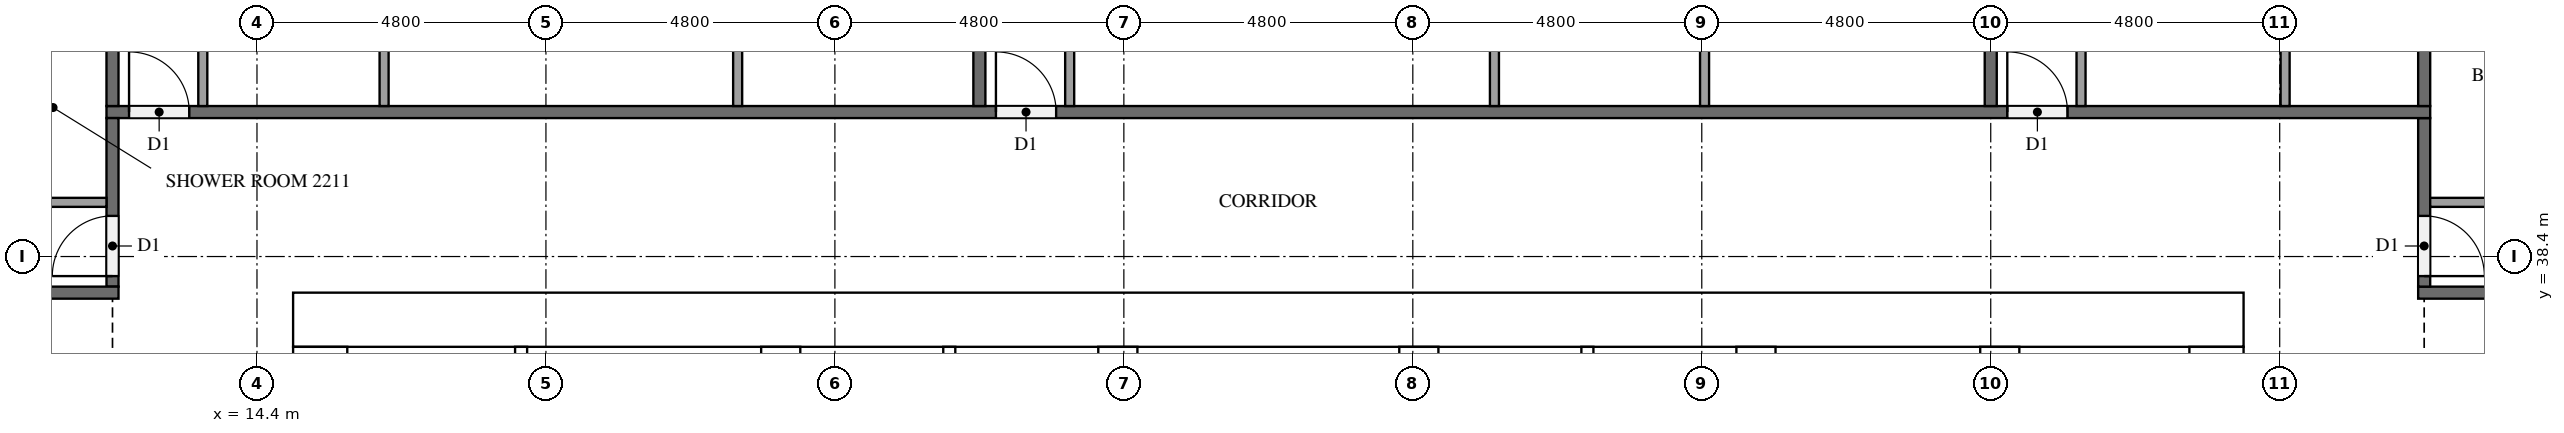
"""IFC4 building model, lengths in metres.
Left out: names, types, materials, properties, quantities, classifications, styles, units other than length and angle.
Written with IfcOpenShell. Run it as: python <this file> out.ifc"""

import sys

from ifc_helpers import new_model, si_unit, direction, frame, frame_2d, origin, place, context, subcontext, project, spatial, rectangle, extrude, element, fill, save


model = new_model("IFC4")
c1 = context("Model", 3, precision=1e-05, world=origin(), true_north=direction((0.0, 1.0)))
c2 = subcontext(c1, "Body", "Model", "MODEL_VIEW")
j1 = project(units=[si_unit("LENGTHUNIT", "METRE"), si_unit("PLANEANGLEUNIT", "RADIAN")], contexts=[c1])
p1 = place(None, origin())
s1 = spatial("IfcSite", under=j1, at=p1, CompositionType="ELEMENT")
p2 = place(p1, origin())
s2 = spatial("IfcBuilding", under=s1, at=p2, CompositionType="ELEMENT")
p3 = place(p2, frame((0.0, 0.0, 89.2)))
s3 = spatial("IfcBuildingStorey", under=s2, at=p3, CompositionType="ELEMENT", Elevation=89.2)
p4 = place(p3, frame((15.0, 37.35, 0.0), z_axis=(0.0, 0.0, 1.0), x_axis=(1.0, 0.0, 0.0)))
e1 = element("IfcWall", 1, at=p4, inside=s3, PredefinedType="SHEAR", context=c2, shape_type="SweptSolid", body=[
    extrude(rectangle(XDim=32.4, YDim=0.9, at=frame_2d((16.2, 0.0))), origin(), (0.0, 0.0, 1.0), 3.2),
])
p5 = place(p4, frame((15.3, 0.0, 0.0)))
e2 = element("IfcOpeningElement", 2, at=p5, cuts=e1, PredefinedType="OPENING", context=c2, shape_type="SweptSolid", body=[
    extrude(rectangle(XDim=1.8, YDim=2.1, at=frame_2d((0.9, 1.05))), frame((0.0, 0.46, 0.0), z_axis=(0.0, -1.0, 0.0), x_axis=(1.0, 0.0, 0.0)), (0.0, 0.0, 1.0), 0.92),
])
p6 = place(p4, frame((1.794, 0.0, 0.0)))
e3 = element("IfcOpeningElement", 3, at=p6, cuts=e1, PredefinedType="OPENING", context=c2, shape_type="SweptSolid", body=[
    extrude(rectangle(XDim=1.0, YDim=2.1, at=frame_2d((0.5, 1.05))), frame((0.0, 0.46, 0.0), z_axis=(0.0, -1.0, 0.0), x_axis=(1.0, 0.0, 0.0)), (0.0, 0.0, 1.0), 0.92),
])
p7 = place(p4, frame((5.331, 0.0, 0.0)))
e4 = element("IfcOpeningElement", 4, at=p7, cuts=e1, PredefinedType="OPENING", context=c2, shape_type="SweptSolid", body=[
    extrude(rectangle(XDim=1.0, YDim=2.1, at=frame_2d((0.5, 1.05))), frame((0.0, 0.46, 0.0), z_axis=(0.0, -1.0, 0.0), x_axis=(1.0, 0.0, 0.0)), (0.0, 0.0, 1.0), 0.92),
])
p8 = place(p3, frame((15.45, 15.9, 0.0), z_axis=(0.0, 0.0, 1.0), x_axis=(0.0, 1.0, 0.0)))
e5 = element("IfcWall", 5, at=p8, inside=s3, PredefinedType="SHEAR", context=c2, shape_type="SweptSolid", body=[
    extrude(rectangle(XDim=21.0, YDim=0.9, at=frame_2d((10.5, 0.0))), origin(), (0.0, 0.0, 1.0), 3.2),
])
p9 = place(p8, frame((4.86, 0.0, 0.0)))
e6 = element("IfcOpeningElement", 6, at=p9, cuts=e5, PredefinedType="OPENING", context=c2, shape_type="SweptSolid", body=[
    extrude(rectangle(XDim=1.2, YDim=2.1, at=frame_2d((0.6, 1.05))), frame((0.0, 0.46, 0.0), z_axis=(0.0, -1.0, 0.0), x_axis=(1.0, 0.0, 0.0)), (0.0, 0.0, 1.0), 0.92),
])
p10 = place(p3, frame((46.95, 15.9, 0.0), z_axis=(0.0, 0.0, 1.0), x_axis=(0.0, 1.0, 0.0)))
e7 = element("IfcWall", 7, at=p10, inside=s3, PredefinedType="SHEAR", context=c2, shape_type="SweptSolid", body=[
    extrude(rectangle(XDim=21.0, YDim=0.9, at=frame_2d((10.5, 0.0))), origin(), (0.0, 0.0, 1.0), 3.2),
])
p11 = place(p10, frame((10.2, 0.0, 0.0)))
e8 = element("IfcOpeningElement", 8, at=p11, cuts=e7, PredefinedType="OPENING", context=c2, shape_type="SweptSolid", body=[
    extrude(rectangle(XDim=1.2, YDim=2.1, at=frame_2d((0.6, 1.05))), frame((0.0, 0.46, 0.0), z_axis=(0.0, -1.0, 0.0), x_axis=(1.0, 0.0, 0.0)), (0.0, 0.0, 1.0), 0.92),
])
p12 = place(p3, frame((23.1, 15.9, 0.0), z_axis=(0.0, 0.0, 1.0), x_axis=(0.0, 1.0, 0.0)))
e9 = element("IfcWall", 9, at=p12, inside=s3, PredefinedType="SHEAR", context=c2, shape_type="SweptSolid", body=[
    extrude(rectangle(XDim=21.0, YDim=0.65, at=frame_2d((10.5, 0.0))), origin(), (0.0, 0.0, 1.0), 3.2),
])
p13 = place(p3, frame((39.3, 27.75, 0.0), z_axis=(0.0, 0.0, 1.0), x_axis=(0.0, 1.0, 0.0)))
e10 = element("IfcWall", 10, at=p13, inside=s3, PredefinedType="SHEAR", context=c2, shape_type="SweptSolid", body=[
    extrude(rectangle(XDim=9.15, YDim=0.65, at=frame_2d((4.575, 0.0))), origin(), (0.0, 0.0, 1.0), 3.2),
])
p14 = place(p3, frame((43.35, 27.75, 0.0), z_axis=(0.0, 0.0, 1.0), x_axis=(0.0, 1.0, 0.0)))
e11 = element("IfcWall", 11, at=p14, inside=s3, PredefinedType="SHEAR", context=c2, shape_type="SweptSolid", body=[
    extrude(rectangle(XDim=9.15, YDim=0.65, at=frame_2d((4.575, 0.0))), origin(), (0.0, 0.0, 1.0), 3.2),
])
p15 = place(p14, frame((7.65, 0.0, 0.0)))
e12 = element("IfcOpeningElement", 12, at=p15, cuts=e11, PredefinedType="OPENING", context=c2, shape_type="SweptSolid", body=[
    extrude(rectangle(XDim=1.2, YDim=2.1, at=frame_2d((0.6, 1.05))), frame((0.0, 0.335, 0.0), z_axis=(0.0, -1.0, 0.0), x_axis=(1.0, 0.0, 0.0)), (0.0, 0.0, 1.0), 0.67),
])
for number, where, z_axis, x_axis in (
    (13, (28.7, 33.875, 0.0), (0.0, 0.0, 1.0), (0.0, 1.0, 0.0)),
    (14, (33.7, 33.875, 0.0), (0.0, 0.0, 1.0), (0.0, 1.0, 0.0)),
):
    element("IfcWall", number, at=place(p3, frame(where, z_axis=z_axis, x_axis=x_axis)), inside=s3, PredefinedType="SHEAR", context=c2, shape_type="SweptSolid", body=[
        extrude(rectangle(XDim=3.025, YDim=0.65, at=frame_2d((1.512, 0.0))), origin(), (0.0, 0.0, 1.0), 3.2),
    ])
for number, where, z_axis, x_axis in (
    (15, (25.9, 33.875, 0.0), (0.0, 0.0, 1.0), (0.0, 1.0, 0.0)),
    (16, (36.5, 33.875, 0.0), (0.0, 0.0, 1.0), (0.0, 1.0, 0.0)),
):
    element("IfcWall", number, at=place(p3, frame(where, z_axis=z_axis, x_axis=x_axis)), inside=s3, PredefinedType="SOLIDWALL", context=c2, shape_type="SweptSolid", body=[
        extrude(rectangle(XDim=3.025, YDim=0.2, at=frame_2d((1.512, 0.0))), origin(), (0.0, 0.0, 1.0), 3.2),
    ])
p16 = place(p3, frame((18.788, 31.575, 0.0), z_axis=(0.0, 0.0, 1.0), x_axis=(0.0, 1.0, 0.0)))
e17 = element("IfcWall", 17, at=p16, inside=s3, PredefinedType="PARTITIONING", context=c2, shape_type="SweptSolid", body=[
    extrude(rectangle(XDim=5.325, YDim=0.2, at=frame_2d((2.663, 0.0))), origin(), (0.0, 0.0, 1.0), 3.2),
])
p17 = place(p3, frame((52.5, 37.8, 0.0), z_axis=(0.0, 0.0, 1.0), x_axis=(-1.0, 0.0, 0.0)))
e18 = element("IfcWall", 18, at=p17, inside=s3, PredefinedType="PARTITIONING", context=c2, shape_type="SweptSolid", body=[
    extrude(rectangle(XDim=2.2, YDim=0.2, at=frame_2d((1.1, 0.0))), origin(), (0.0, 0.0, 1.0), 3.2),
])
p18 = place(p3, frame((50.4, 40.7, 0.0), z_axis=(0.0, 0.0, 1.0), x_axis=(0.0, -1.0, 0.0)))
e19 = element("IfcWall", 19, at=p18, inside=s3, PredefinedType="PARTITIONING", context=c2, shape_type="SweptSolid", body=[
    extrude(rectangle(XDim=2.8, YDim=0.2, at=frame_2d((1.4, 0.0))), origin(), (0.0, 0.0, 1.0), 3.2),
])
p19 = place(p18, frame((1.625, 0.0, 0.0)))
e20 = element("IfcOpeningElement", 20, at=p19, cuts=e19, PredefinedType="OPENING", context=c2, shape_type="SweptSolid", body=[
    extrude(rectangle(XDim=1.0, YDim=2.1, at=frame_2d((0.5, 1.05))), frame((0.0, 0.11, 0.0), z_axis=(0.0, -1.0, 0.0), x_axis=(1.0, 0.0, 0.0)), (0.0, 0.0, 1.0), 0.22),
])
p20 = place(p3, frame((11.9, 40.8, 0.0), z_axis=(0.0, 0.0, 1.0), x_axis=(1.0, 0.0, 0.0)))
e21 = element("IfcWall", 21, at=p20, inside=s3, PredefinedType="PARTITIONING", context=c2, shape_type="SweptSolid", body=[
    extrude(rectangle(XDim=38.6, YDim=0.2, at=frame_2d((19.3, 0.0))), origin(), (0.0, 0.0, 1.0), 3.2),
])
p21 = place(p20, frame((31.575, 0.0, 0.0)))
e22 = element("IfcOpeningElement", 22, at=p21, cuts=e21, PredefinedType="OPENING", context=c2, shape_type="SweptSolid", body=[
    extrude(rectangle(XDim=1.0, YDim=2.1, at=frame_2d((0.5, 1.05))), frame((0.0, 0.11, 0.0), z_axis=(0.0, -1.0, 0.0), x_axis=(1.0, 0.0, 0.0)), (0.0, 0.0, 1.0), 0.22),
])
p22 = place(p20, frame((14.775, 0.0, 0.0)))
e23 = element("IfcOpeningElement", 23, at=p22, cuts=e21, PredefinedType="OPENING", context=c2, shape_type="SweptSolid", body=[
    extrude(rectangle(XDim=1.0, YDim=2.1, at=frame_2d((0.5, 1.05))), frame((0.0, 0.11, 0.0), z_axis=(0.0, -1.0, 0.0), x_axis=(1.0, 0.0, 0.0)), (0.0, 0.0, 1.0), 0.22),
])
p23 = place(p20, frame((0.375, 0.0, 0.0)))
e24 = element("IfcOpeningElement", 24, at=p23, cuts=e21, PredefinedType="OPENING", context=c2, shape_type="SweptSolid", body=[
    extrude(rectangle(XDim=1.0, YDim=2.1, at=frame_2d((0.5, 1.05))), frame((0.0, 0.11, 0.0), z_axis=(0.0, -1.0, 0.0), x_axis=(1.0, 0.0, 0.0)), (0.0, 0.0, 1.0), 0.22),
])
p24 = place(p3, frame((12.0, 37.9, 0.0), z_axis=(0.0, 0.0, 1.0), x_axis=(0.0, 1.0, 0.0)))
e25 = element("IfcWall", 25, at=p24, inside=s3, PredefinedType="PARTITIONING", context=c2, shape_type="SweptSolid", body=[
    extrude(rectangle(XDim=2.8, YDim=0.2, at=frame_2d((1.4, 0.0))), origin(), (0.0, 0.0, 1.0), 3.2),
])
p25 = place(p24, frame((0.175, 0.0, 0.0)))
e26 = element("IfcOpeningElement", 26, at=p25, cuts=e25, PredefinedType="OPENING", context=c2, shape_type="SweptSolid", body=[
    extrude(rectangle(XDim=1.0, YDim=2.1, at=frame_2d((0.5, 1.05))), frame((0.0, 0.11, 0.0), z_axis=(0.0, -1.0, 0.0), x_axis=(1.0, 0.0, 0.0)), (0.0, 0.0, 1.0), 0.22),
])
p26 = place(p3, frame((12.1, 37.8, 0.0), z_axis=(0.0, 0.0, 1.0), x_axis=(-1.0, 0.0, 0.0)))
e27 = element("IfcWall", 27, at=p26, inside=s3, PredefinedType="PARTITIONING", context=c2, shape_type="SweptSolid", body=[
    extrude(rectangle(XDim=2.2, YDim=0.2, at=frame_2d((1.1, 0.0))), origin(), (0.0, 0.0, 1.0), 3.2),
])
for number, where, z_axis, x_axis in (
    (28, (50.4, 40.9, 0.0), (0.0, 0.0, 1.0), (0.0, 1.0, 0.0)),
    (29, (43.2, 52.7, 0.0), (0.0, 0.0, 1.0), (0.0, -1.0, 0.0)),
    (30, (26.4, 52.7, 0.0), (0.0, 0.0, 1.0), (0.0, -1.0, 0.0)),
    (31, (12.0, 52.7, 0.0), (0.0, 0.0, 1.0), (0.0, -1.0, 0.0)),
):
    element("IfcWall", number, at=place(p3, frame(where, z_axis=z_axis, x_axis=x_axis)), inside=s3, PredefinedType="PARTITIONING", context=c2, shape_type="SweptSolid", body=[
        extrude(rectangle(XDim=11.8, YDim=0.2, at=frame_2d((5.9, 0.0))), origin(), (0.0, 0.0, 1.0), 3.2),
    ])
p27 = place(p3, frame((50.5, 39.3, 0.0), z_axis=(0.0, 0.0, 1.0), x_axis=(1.0, 0.0, 0.0)))
e32 = element("IfcWall", 32, at=p27, inside=s3, PredefinedType="PARTITIONING", context=c2, shape_type="SweptSolid", body=[
    extrude(rectangle(XDim=4.025, YDim=0.15, at=frame_2d((2.012, 0.0))), origin(), (0.0, 0.0, 1.0), 3.2),
])
p28 = place(p3, frame((48.09, 40.9, 0.0), z_axis=(0.0, 0.0, 1.0), x_axis=(0.0, 1.0, 0.0)))
e33 = element("IfcWall", 33, at=p28, inside=s3, PredefinedType="PARTITIONING", context=c2, shape_type="SweptSolid", body=[
    extrude(rectangle(XDim=4.175, YDim=0.15, at=frame_2d((2.087, 0.0))), origin(), (0.0, 0.0, 1.0), 3.2),
])
p29 = place(p3, frame((44.7, 40.9, 0.0), z_axis=(0.0, 0.0, 1.0), x_axis=(0.0, 1.0, 0.0)))
e34 = element("IfcWall", 34, at=p29, inside=s3, PredefinedType="PARTITIONING", context=c2, shape_type="SweptSolid", body=[
    extrude(rectangle(XDim=4.325, YDim=0.15, at=frame_2d((2.163, 0.0))), origin(), (0.0, 0.0, 1.0), 3.2),
])
for number, where, z_axis, x_axis in (
    (35, (34.956, 40.9, 0.0), (0.0, 0.0, 1.0), (0.0, 1.0, 0.0)),
    (36, (38.446, 40.9, 0.0), (0.0, 0.0, 1.0), (0.0, 1.0, 0.0)),
):
    element("IfcWall", number, at=place(p3, frame(where, z_axis=z_axis, x_axis=x_axis)), inside=s3, PredefinedType="PARTITIONING", context=c2, shape_type="SweptSolid", body=[
        extrude(rectangle(XDim=4.475, YDim=0.15, at=frame_2d((2.238, 0.0))), origin(), (0.0, 0.0, 1.0), 3.2),
    ])
p30 = place(p3, frame((27.9, 40.9, 0.0), z_axis=(0.0, 0.0, 1.0), x_axis=(0.0, 1.0, 0.0)))
e37 = element("IfcWall", 37, at=p30, inside=s3, PredefinedType="PARTITIONING", context=c2, shape_type="SweptSolid", body=[
    extrude(rectangle(XDim=4.625, YDim=0.15, at=frame_2d((2.312, 0.0))), origin(), (0.0, 0.0, 1.0), 3.2),
])
for number, where, z_axis, x_axis in (
    (38, (16.511, 40.9, 0.0), (0.0, 0.0, 1.0), (0.0, 1.0, 0.0)),
    (39, (22.385, 40.9, 0.0), (0.0, 0.0, 1.0), (0.0, 1.0, 0.0)),
):
    element("IfcWall", number, at=place(p3, frame(where, z_axis=z_axis, x_axis=x_axis)), inside=s3, PredefinedType="PARTITIONING", context=c2, shape_type="SweptSolid", body=[
        extrude(rectangle(XDim=2.975, YDim=0.15, at=frame_2d((1.488, 0.0))), origin(), (0.0, 0.0, 1.0), 3.2),
    ])
p31 = place(p3, frame((13.5, 40.9, 0.0), z_axis=(0.0, 0.0, 1.0), x_axis=(0.0, 1.0, 0.0)))
e40 = element("IfcWall", 40, at=p31, inside=s3, PredefinedType="PARTITIONING", context=c2, shape_type="SweptSolid", body=[
    extrude(rectangle(XDim=3.125, YDim=0.15, at=frame_2d((1.562, 0.0))), origin(), (0.0, 0.0, 1.0), 3.2),
])
p32 = place(p3, frame((11.9, 39.3, 0.0), z_axis=(0.0, 0.0, 1.0), x_axis=(-1.0, 0.0, 0.0)))
e41 = element("IfcWall", 41, at=p32, inside=s3, PredefinedType="PARTITIONING", context=c2, shape_type="SweptSolid", body=[
    extrude(rectangle(XDim=1.925, YDim=0.15, at=frame_2d((0.962, 0.0))), origin(), (0.0, 0.0, 1.0), 3.2),
])
p33 = place(p5, origin())
e42 = element("IfcDoor", 42, at=p33, inside=s3, OperationType="DOUBLE_DOOR_SINGLE_SWING", PredefinedType="DOOR", context=c2, shape_type="SweptSolid", body=[
    extrude(rectangle(XDim=1.8, YDim=2.1, at=frame_2d((0.9, 1.05))), frame((0.0, 0.025, 0.0), z_axis=(0.0, -1.0, 0.0), x_axis=(1.0, 0.0, 0.0)), (0.0, 0.0, 1.0), 0.05),
])
fill(e2, e42)
p34 = place(p6, origin())
e43 = element("IfcDoor", 43, at=p34, inside=s3, OperationType="SINGLE_SWING_LEFT", PredefinedType="DOOR", context=c2, shape_type="SweptSolid", body=[
    extrude(rectangle(XDim=1.0, YDim=2.1, at=frame_2d((0.5, 1.05))), frame((0.0, 0.025, 0.0), z_axis=(0.0, -1.0, 0.0), x_axis=(1.0, 0.0, 0.0)), (0.0, 0.0, 1.0), 0.05),
])
fill(e3, e43)
p35 = place(p7, origin())
e44 = element("IfcDoor", 44, at=p35, inside=s3, OperationType="SINGLE_SWING_RIGHT", PredefinedType="DOOR", context=c2, shape_type="SweptSolid", body=[
    extrude(rectangle(XDim=1.0, YDim=2.1, at=frame_2d((0.5, 1.05))), frame((0.0, 0.025, 0.0), z_axis=(0.0, -1.0, 0.0), x_axis=(1.0, 0.0, 0.0)), (0.0, 0.0, 1.0), 0.05),
])
fill(e4, e44)
p36 = place(p19, origin())
e45 = element("IfcDoor", 45, at=p36, inside=s3, OperationType="SINGLE_SWING_RIGHT", PredefinedType="DOOR", context=c2, shape_type="SweptSolid", body=[
    extrude(rectangle(XDim=1.0, YDim=2.1, at=frame_2d((0.5, 1.05))), frame((0.0, 0.025, 0.0), z_axis=(0.0, -1.0, 0.0), x_axis=(1.0, 0.0, 0.0)), (0.0, 0.0, 1.0), 0.05),
])
fill(e20, e45)
p37 = place(p21, origin())
e46 = element("IfcDoor", 46, at=p37, inside=s3, OperationType="SINGLE_SWING_LEFT", PredefinedType="DOOR", context=c2, shape_type="SweptSolid", body=[
    extrude(rectangle(XDim=1.0, YDim=2.1, at=frame_2d((0.5, 1.05))), frame((0.0, 0.025, 0.0), z_axis=(0.0, -1.0, 0.0), x_axis=(1.0, 0.0, 0.0)), (0.0, 0.0, 1.0), 0.05),
])
fill(e22, e46)
p38 = place(p22, origin())
e47 = element("IfcDoor", 47, at=p38, inside=s3, OperationType="SINGLE_SWING_LEFT", PredefinedType="DOOR", context=c2, shape_type="SweptSolid", body=[
    extrude(rectangle(XDim=1.0, YDim=2.1, at=frame_2d((0.5, 1.05))), frame((0.0, 0.025, 0.0), z_axis=(0.0, -1.0, 0.0), x_axis=(1.0, 0.0, 0.0)), (0.0, 0.0, 1.0), 0.05),
])
fill(e23, e47)
p39 = place(p23, origin())
e48 = element("IfcDoor", 48, at=p39, inside=s3, OperationType="SINGLE_SWING_LEFT", PredefinedType="DOOR", context=c2, shape_type="SweptSolid", body=[
    extrude(rectangle(XDim=1.0, YDim=2.1, at=frame_2d((0.5, 1.05))), frame((0.0, 0.025, 0.0), z_axis=(0.0, -1.0, 0.0), x_axis=(1.0, 0.0, 0.0)), (0.0, 0.0, 1.0), 0.05),
])
fill(e24, e48)
p40 = place(p25, origin())
e49 = element("IfcDoor", 49, at=p40, inside=s3, OperationType="SINGLE_SWING_LEFT", PredefinedType="DOOR", context=c2, shape_type="SweptSolid", body=[
    extrude(rectangle(XDim=1.0, YDim=2.1, at=frame_2d((0.5, 1.05))), frame((0.0, 0.025, 0.0), z_axis=(0.0, -1.0, 0.0), x_axis=(1.0, 0.0, 0.0)), (0.0, 0.0, 1.0), 0.05),
])
fill(e26, e49)
save(model, sys.argv[1])
